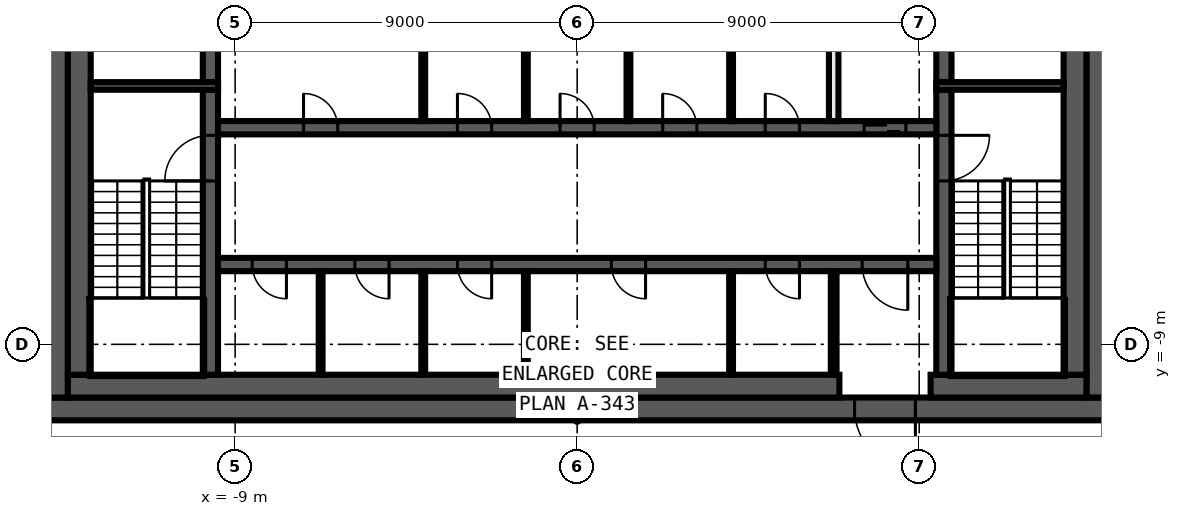
"""IFC4 building model, lengths in metres.
Left out: names, types, materials, properties, quantities, classifications, styles, units other than length and angle.
Written with IfcOpenShell. Run it as: python <this file> out.ifc"""

import sys

from ifc_helpers import new_model, si_unit, direction, frame, frame_2d, origin, place, context, subcontext, project, spatial, rectangle, extrude, element, fill, save


model = new_model("IFC4")
c1 = context("Model", 3, precision=1e-05, world=origin(), true_north=direction((0.0, 1.0)))
c2 = subcontext(c1, "Body", "Model", "MODEL_VIEW")
j1 = project(units=[si_unit("LENGTHUNIT", "METRE"), si_unit("PLANEANGLEUNIT", "RADIAN")], contexts=[c1])
p1 = place(None, origin())
s1 = spatial("IfcSite", under=j1, at=p1, CompositionType="ELEMENT")
p2 = place(p1, origin())
s2 = spatial("IfcBuilding", under=s1, at=p2, CompositionType="ELEMENT")
p3 = place(p2, frame((0.0, 0.0, 371.6)))
s3 = spatial("IfcBuildingStorey", under=s2, at=p3, CompositionType="ELEMENT", Elevation=371.6)
p4 = place(p3, frame((11.367, -20.469, 0.0), z_axis=(0.0, 0.0, 1.0), x_axis=(0.424125024155, 0.905603646131, 0.0)))
e1 = element("IfcWall", 1, at=p4, inside=s3, PredefinedType="SOLIDWALL", context=c2, shape_type="SweptSolid", body=[
    extrude(rectangle(XDim=28.801, YDim=0.25, at=frame_2d((14.401, 0.0))), origin(), (0.0, 0.0, 1.0), 3.8),
])
p5 = place(p3, frame((-11.138, 20.28, 0.0), z_axis=(0.0, 0.0, 1.0), x_axis=(-0.441342255748, -0.897338850876, 0.0)))
e2 = element("IfcWall", 2, at=p5, inside=s3, PredefinedType="SOLIDWALL", context=c2, shape_type="SweptSolid", body=[
    extrude(rectangle(XDim=28.805, YDim=0.25, at=frame_2d((14.403, 0.0))), origin(), (0.0, 0.0, 1.0), 3.8),
])
p6 = place(p3, frame((-23.851, -5.568, 0.0), z_axis=(0.0, 0.0, 1.0), x_axis=(0.701718568407, -0.712454244673, 0.0)))
e3 = element("IfcWall", 3, at=p6, inside=s3, PredefinedType="SOLIDWALL", context=c2, shape_type="SweptSolid", body=[
    extrude(rectangle(XDim=20.785, YDim=0.25, at=frame_2d((10.393, 0.0))), origin(), (0.0, 0.0, 1.0), 3.8),
])
p7 = place(p3, frame((14.0, -10.7, 0.0), z_axis=(0.0, 0.0, 1.0), x_axis=(-1.0, 0.0, 0.0)))
e4 = element("IfcWall", 4, at=p7, inside=s3, PredefinedType="SHEAR", context=c2, shape_type="SweptSolid", body=[
    extrude(rectangle(XDim=28.0, YDim=0.6, at=frame_2d((14.0, 0.0))), origin(), (0.0, 0.0, 1.0), 3.9),
])
p8 = place(p7, frame((5.1, 0.0, 0.0)))
e5 = element("IfcOpeningElement", 5, at=p8, cuts=e4, PredefinedType="OPENING", context=c2, shape_type="SweptSolid", body=[
    extrude(rectangle(XDim=1.6, YDim=2.1, at=frame_2d((0.8, 1.05))), frame((0.0, 0.31, 0.0), z_axis=(0.0, -1.0, 0.0), x_axis=(1.0, 0.0, 0.0)), (0.0, 0.0, 1.0), 0.62),
])
for number, where, z_axis, x_axis in (
    (6, (13.7, 10.4, 0.0), (0.0, 0.0, 1.0), (0.0, -1.0, 0.0)),
    (7, (-13.7, -10.4, 0.0), (0.0, 0.0, 1.0), (0.0, 1.0, 0.0)),
):
    element("IfcWall", number, at=place(p3, frame(where, z_axis=z_axis, x_axis=x_axis)), inside=s3, PredefinedType="SHEAR", context=c2, shape_type="SweptSolid", body=[
        extrude(rectangle(XDim=20.8, YDim=0.6, at=frame_2d((10.4, 0.0))), origin(), (0.0, 0.0, 1.0), 3.9),
    ])
p9 = place(p3, frame((13.4, -10.1, 0.0), z_axis=(0.0, 0.0, 1.0), x_axis=(-1.0, 0.0, 0.0)))
e8 = element("IfcWall", 8, at=p9, inside=s3, PredefinedType="SHEAR", context=c2, shape_type="SweptSolid", body=[
    extrude(rectangle(XDim=4.1, YDim=0.6, at=frame_2d((2.05, 0.0))), origin(), (0.0, 0.0, 1.0), 3.9),
])
p10 = place(p3, frame((6.9, -10.1, 0.0), z_axis=(0.0, 0.0, 1.0), x_axis=(-1.0, 0.0, 0.0)))
e9 = element("IfcWall", 9, at=p10, inside=s3, PredefinedType="SHEAR", context=c2, shape_type="SweptSolid", body=[
    extrude(rectangle(XDim=20.3, YDim=0.6, at=frame_2d((10.15, 0.0))), origin(), (0.0, 0.0, 1.0), 3.9),
])
for number, where, z_axis, x_axis in (
    (10, (13.1, 9.8, 0.0), (0.0, 0.0, 1.0), (0.0, -1.0, 0.0)),
    (11, (-13.1, -9.8, 0.0), (0.0, 0.0, 1.0), (0.0, 1.0, 0.0)),
):
    element("IfcWall", number, at=place(p3, frame(where, z_axis=z_axis, x_axis=x_axis)), inside=s3, PredefinedType="SHEAR", context=c2, shape_type="SweptSolid", body=[
        extrude(rectangle(XDim=19.6, YDim=0.6, at=frame_2d((9.8, 0.0))), origin(), (0.0, 0.0, 1.0), 3.9),
    ])
p11 = place(p3, frame((9.65, -2.3, 0.0), z_axis=(0.0, 0.0, 1.0), x_axis=(0.0, -1.0, 0.0)))
e12 = element("IfcWall", 12, at=p11, inside=s3, PredefinedType="SHEAR", context=c2, shape_type="SweptSolid", body=[
    extrude(rectangle(XDim=7.5, YDim=0.4, at=frame_2d((3.75, 0.0))), origin(), (0.0, 0.0, 1.0), 3.9),
])
p12 = place(p11, frame((1.2, 0.0, 0.0)))
e13 = element("IfcOpeningElement", 13, at=p12, cuts=e12, PredefinedType="OPENING", context=c2, shape_type="SweptSolid", body=[
    extrude(rectangle(XDim=1.2, YDim=2.1, at=frame_2d((0.6, 1.05))), frame((0.0, 0.21, 0.0), z_axis=(0.0, -1.0, 0.0), x_axis=(1.0, 0.0, 0.0)), (0.0, 0.0, 1.0), 0.42),
])
p13 = place(p3, frame((9.65, 2.1, 0.0), z_axis=(0.0, 0.0, 1.0), x_axis=(0.0, -1.0, 0.0)))
e14 = element("IfcWall", 14, at=p13, inside=s3, PredefinedType="SHEAR", context=c2, shape_type="SweptSolid", body=[
    extrude(rectangle(XDim=4.2, YDim=0.4, at=frame_2d((2.1, 0.0))), origin(), (0.0, 0.0, 1.0), 3.9),
])
p14 = place(p13, frame((0.15, 0.0, 0.0)))
e15 = element("IfcOpeningElement", 15, at=p14, cuts=e14, PredefinedType="OPENING", context=c2, shape_type="SweptSolid", body=[
    extrude(rectangle(XDim=0.9, YDim=2.1, at=frame_2d((0.45, 1.05))), frame((0.0, 0.21, 0.0), z_axis=(0.0, -1.0, 0.0), x_axis=(1.0, 0.0, 0.0)), (0.0, 0.0, 1.0), 0.42),
])
p15 = place(p3, frame((-9.65, -9.8, 0.0), z_axis=(0.0, 0.0, 1.0), x_axis=(0.0, 1.0, 0.0)))
e16 = element("IfcWall", 16, at=p15, inside=s3, PredefinedType="SHEAR", context=c2, shape_type="SweptSolid", body=[
    extrude(rectangle(XDim=7.5, YDim=0.4, at=frame_2d((3.75, 0.0))), origin(), (0.0, 0.0, 1.0), 3.9),
])
p16 = place(p15, frame((5.1, 0.0, 0.0)))
e17 = element("IfcOpeningElement", 17, at=p16, cuts=e16, PredefinedType="OPENING", context=c2, shape_type="SweptSolid", body=[
    extrude(rectangle(XDim=1.2, YDim=2.1, at=frame_2d((0.6, 1.05))), frame((0.0, 0.21, 0.0), z_axis=(0.0, -1.0, 0.0), x_axis=(1.0, 0.0, 0.0)), (0.0, 0.0, 1.0), 0.42),
])
p17 = place(p3, frame((-9.65, -2.1, 0.0), z_axis=(0.0, 0.0, 1.0), x_axis=(0.0, 1.0, 0.0)))
e18 = element("IfcWall", 18, at=p17, inside=s3, PredefinedType="SHEAR", context=c2, shape_type="SweptSolid", body=[
    extrude(rectangle(XDim=4.2, YDim=0.4, at=frame_2d((2.1, 0.0))), origin(), (0.0, 0.0, 1.0), 3.9),
])
for number, where, z_axis, x_axis in (
    (19, (9.45, -2.2, 0.0), (0.0, 0.0, 1.0), (1.0, 0.0, 0.0)),
    (20, (-9.45, -2.2, 0.0), (0.0, 0.0, 1.0), (-1.0, 0.0, 0.0)),
):
    element("IfcWall", number, at=place(p3, frame(where, z_axis=z_axis, x_axis=x_axis)), inside=s3, PredefinedType="SHEAR", context=c2, shape_type="SweptSolid", body=[
        extrude(rectangle(XDim=3.35, YDim=0.2, at=frame_2d((1.675, 0.0))), origin(), (0.0, 0.0, 1.0), 3.9),
    ])
p18 = place(p3, frame((-9.45, -3.3, 0.0), z_axis=(0.0, 0.0, 1.0), x_axis=(1.0, 0.0, 0.0)))
e21 = element("IfcWall", 21, at=p18, inside=s3, PredefinedType="SHEAR", context=c2, shape_type="SweptSolid", body=[
    extrude(rectangle(XDim=18.9, YDim=0.35, at=frame_2d((9.45, 0.0))), origin(), (0.0, 0.0, 1.0), 3.9),
])
p19 = place(p18, frame((17.0, 0.0, 0.0)))
e22 = element("IfcOpeningElement", 22, at=p19, cuts=e21, PredefinedType="OPENING", context=c2, shape_type="SweptSolid", body=[
    extrude(rectangle(XDim=1.1, YDim=2.1, at=frame_2d((0.55, 1.05))), frame((0.0, 0.185, 0.0), z_axis=(0.0, -1.0, 0.0), x_axis=(1.0, 0.0, 0.0)), (0.0, 0.0, 1.0), 0.37),
])
p20 = place(p18, frame((2.25, 0.0, 0.0)))
e23 = element("IfcOpeningElement", 23, at=p20, cuts=e21, PredefinedType="OPENING", context=c2, shape_type="SweptSolid", body=[
    extrude(rectangle(XDim=0.9, YDim=2.1, at=frame_2d((0.45, 1.05))), frame((0.0, 0.185, 0.0), z_axis=(0.0, -1.0, 0.0), x_axis=(1.0, 0.0, 0.0)), (0.0, 0.0, 1.0), 0.37),
])
p21 = place(p18, frame((6.3, 0.0, 0.0)))
e24 = element("IfcOpeningElement", 24, at=p21, cuts=e21, PredefinedType="OPENING", context=c2, shape_type="SweptSolid", body=[
    extrude(rectangle(XDim=0.9, YDim=2.1, at=frame_2d((0.45, 1.05))), frame((0.0, 0.185, 0.0), z_axis=(0.0, -1.0, 0.0), x_axis=(1.0, 0.0, 0.0)), (0.0, 0.0, 1.0), 0.37),
])
p22 = place(p18, frame((9.0, 0.0, 0.0)))
e25 = element("IfcOpeningElement", 25, at=p22, cuts=e21, PredefinedType="OPENING", context=c2, shape_type="SweptSolid", body=[
    extrude(rectangle(XDim=0.9, YDim=2.1, at=frame_2d((0.45, 1.05))), frame((0.0, 0.185, 0.0), z_axis=(0.0, -1.0, 0.0), x_axis=(1.0, 0.0, 0.0)), (0.0, 0.0, 1.0), 0.37),
])
p23 = place(p18, frame((11.7, 0.0, 0.0)))
e26 = element("IfcOpeningElement", 26, at=p23, cuts=e21, PredefinedType="OPENING", context=c2, shape_type="SweptSolid", body=[
    extrude(rectangle(XDim=0.9, YDim=2.1, at=frame_2d((0.45, 1.05))), frame((0.0, 0.185, 0.0), z_axis=(0.0, -1.0, 0.0), x_axis=(1.0, 0.0, 0.0)), (0.0, 0.0, 1.0), 0.37),
])
p24 = place(p18, frame((14.4, 0.0, 0.0)))
e27 = element("IfcOpeningElement", 27, at=p24, cuts=e21, PredefinedType="OPENING", context=c2, shape_type="SweptSolid", body=[
    extrude(rectangle(XDim=0.9, YDim=2.1, at=frame_2d((0.45, 1.05))), frame((0.0, 0.185, 0.0), z_axis=(0.0, -1.0, 0.0), x_axis=(1.0, 0.0, 0.0)), (0.0, 0.0, 1.0), 0.37),
])
p25 = place(p3, frame((9.45, -6.9, 0.0), z_axis=(0.0, 0.0, 1.0), x_axis=(-1.0, 0.0, 0.0)))
e28 = element("IfcWall", 28, at=p25, inside=s3, PredefinedType="SHEAR", context=c2, shape_type="SweptSolid", body=[
    extrude(rectangle(XDim=18.9, YDim=0.35, at=frame_2d((9.45, 0.0))), origin(), (0.0, 0.0, 1.0), 3.9),
])
p26 = place(p25, frame((0.75, 0.0, 0.0)))
e29 = element("IfcOpeningElement", 29, at=p26, cuts=e28, PredefinedType="OPENING", context=c2, shape_type="SweptSolid", body=[
    extrude(rectangle(XDim=1.2, YDim=2.1, at=frame_2d((0.6, 1.05))), frame((0.0, 0.185, 0.0), z_axis=(0.0, -1.0, 0.0), x_axis=(1.0, 0.0, 0.0)), (0.0, 0.0, 1.0), 0.37),
])
p27 = place(p25, frame((17.1, 0.0, 0.0)))
e30 = element("IfcOpeningElement", 30, at=p27, cuts=e28, PredefinedType="OPENING", context=c2, shape_type="SweptSolid", body=[
    extrude(rectangle(XDim=0.9, YDim=2.1, at=frame_2d((0.45, 1.05))), frame((0.0, 0.185, 0.0), z_axis=(0.0, -1.0, 0.0), x_axis=(1.0, 0.0, 0.0)), (0.0, 0.0, 1.0), 0.37),
])
p28 = place(p25, frame((14.4, 0.0, 0.0)))
e31 = element("IfcOpeningElement", 31, at=p28, cuts=e28, PredefinedType="OPENING", context=c2, shape_type="SweptSolid", body=[
    extrude(rectangle(XDim=0.9, YDim=2.1, at=frame_2d((0.45, 1.05))), frame((0.0, 0.185, 0.0), z_axis=(0.0, -1.0, 0.0), x_axis=(1.0, 0.0, 0.0)), (0.0, 0.0, 1.0), 0.37),
])
p29 = place(p25, frame((11.7, 0.0, 0.0)))
e32 = element("IfcOpeningElement", 32, at=p29, cuts=e28, PredefinedType="OPENING", context=c2, shape_type="SweptSolid", body=[
    extrude(rectangle(XDim=0.9, YDim=2.1, at=frame_2d((0.45, 1.05))), frame((0.0, 0.185, 0.0), z_axis=(0.0, -1.0, 0.0), x_axis=(1.0, 0.0, 0.0)), (0.0, 0.0, 1.0), 0.37),
])
p30 = place(p25, frame((7.65, 0.0, 0.0)))
e33 = element("IfcOpeningElement", 33, at=p30, cuts=e28, PredefinedType="OPENING", context=c2, shape_type="SweptSolid", body=[
    extrude(rectangle(XDim=0.9, YDim=2.1, at=frame_2d((0.45, 1.05))), frame((0.0, 0.185, 0.0), z_axis=(0.0, -1.0, 0.0), x_axis=(1.0, 0.0, 0.0)), (0.0, 0.0, 1.0), 0.37),
])
p31 = place(p25, frame((3.6, 0.0, 0.0)))
e34 = element("IfcOpeningElement", 34, at=p31, cuts=e28, PredefinedType="OPENING", context=c2, shape_type="SweptSolid", body=[
    extrude(rectangle(XDim=0.9, YDim=2.1, at=frame_2d((0.45, 1.05))), frame((0.0, 0.185, 0.0), z_axis=(0.0, -1.0, 0.0), x_axis=(1.0, 0.0, 0.0)), (0.0, 0.0, 1.0), 0.37),
])
p32 = place(p3, frame((6.75, -9.8, 0.0), z_axis=(0.0, 0.0, 1.0), x_axis=(0.0, 1.0, 0.0)))
e35 = element("IfcWall", 35, at=p32, inside=s3, PredefinedType="PARTITIONING", context=c2, shape_type="SweptSolid", body=[
    extrude(rectangle(XDim=2.725, YDim=0.15, at=frame_2d((1.363, 0.0))), origin(), (0.0, 0.0, 1.0), 3.9),
])
p33 = place(p3, frame((6.75, -3.125, 0.0), z_axis=(0.0, 0.0, 1.0), x_axis=(0.0, 1.0, 0.0)))
e36 = element("IfcWall", 36, at=p33, inside=s3, PredefinedType="SOLIDWALL", context=c2, shape_type="SweptSolid", body=[
    extrude(rectangle(XDim=2.725, YDim=0.25, at=frame_2d((1.363, 0.0))), origin(), (0.0, 0.0, 1.0), 3.9),
])
for number, where, z_axis, x_axis in (
    (37, (4.05, -9.8, 0.0), (0.0, 0.0, 1.0), (0.0, 1.0, 0.0)),
    (38, (4.05, -3.125, 0.0), (0.0, 0.0, 1.0), (0.0, 1.0, 0.0)),
    (39, (1.35, -3.125, 0.0), (0.0, 0.0, 1.0), (0.0, 1.0, 0.0)),
    (40, (-1.35, -9.8, 0.0), (0.0, 0.0, 1.0), (0.0, 1.0, 0.0)),
    (41, (-1.35, -3.125, 0.0), (0.0, 0.0, 1.0), (0.0, 1.0, 0.0)),
    (42, (-4.05, -9.8, 0.0), (0.0, 0.0, 1.0), (0.0, 1.0, 0.0)),
    (43, (-4.05, -3.125, 0.0), (0.0, 0.0, 1.0), (0.0, 1.0, 0.0)),
    (44, (-6.75, -9.8, 0.0), (0.0, 0.0, 1.0), (0.0, 1.0, 0.0)),
):
    element("IfcWall", number, at=place(p3, frame(where, z_axis=z_axis, x_axis=x_axis)), inside=s3, PredefinedType="PARTITIONING", context=c2, shape_type="SweptSolid", body=[
        extrude(rectangle(XDim=2.725, YDim=0.1, at=frame_2d((1.363, 0.0))), origin(), (0.0, 0.0, 1.0), 3.9),
    ])
p34 = place(p19, origin())
e45 = element("IfcDoor", 45, at=p34, inside=s3, OperationType="DOUBLE_DOOR_SLIDING", PredefinedType="DOOR", context=c2, shape_type="SweptSolid", body=[
    extrude(rectangle(XDim=1.1, YDim=2.1, at=frame_2d((0.55, 1.05))), frame((0.0, 0.025, 0.0), z_axis=(0.0, -1.0, 0.0), x_axis=(1.0, 0.0, 0.0)), (0.0, 0.0, 1.0), 0.05),
])
fill(e22, e45)
p35 = place(p8, origin())
e46 = element("IfcDoor", 46, at=p35, inside=s3, OperationType="DOUBLE_DOOR_SINGLE_SWING", PredefinedType="DOOR", context=c2, shape_type="SweptSolid", body=[
    extrude(rectangle(XDim=1.6, YDim=2.1, at=frame_2d((0.8, 1.05))), frame((0.0, 0.025, 0.0), z_axis=(0.0, -1.0, 0.0), x_axis=(1.0, 0.0, 0.0)), (0.0, 0.0, 1.0), 0.05),
])
fill(e5, e46)
p36 = place(p26, origin())
e47 = element("IfcDoor", 47, at=p36, inside=s3, OperationType="SINGLE_SWING_LEFT", PredefinedType="DOOR", context=c2, shape_type="SweptSolid", body=[
    extrude(rectangle(XDim=1.2, YDim=2.1, at=frame_2d((0.6, 1.05))), frame((0.0, 0.025, 0.0), z_axis=(0.0, -1.0, 0.0), x_axis=(1.0, 0.0, 0.0)), (0.0, 0.0, 1.0), 0.05),
])
fill(e29, e47)
p37 = place(p20, origin())
e48 = element("IfcDoor", 48, at=p37, inside=s3, OperationType="SINGLE_SWING_LEFT", PredefinedType="DOOR", context=c2, shape_type="SweptSolid", body=[
    extrude(rectangle(XDim=0.9, YDim=2.1, at=frame_2d((0.45, 1.05))), frame((0.0, 0.025, 0.0), z_axis=(0.0, -1.0, 0.0), x_axis=(1.0, 0.0, 0.0)), (0.0, 0.0, 1.0), 0.05),
])
fill(e23, e48)
p38 = place(p21, origin())
e49 = element("IfcDoor", 49, at=p38, inside=s3, OperationType="SINGLE_SWING_RIGHT", PredefinedType="DOOR", context=c2, shape_type="SweptSolid", body=[
    extrude(rectangle(XDim=0.9, YDim=2.1, at=frame_2d((0.45, 1.05))), frame((0.0, 0.025, 0.0), z_axis=(0.0, -1.0, 0.0), x_axis=(1.0, 0.0, 0.0)), (0.0, 0.0, 1.0), 0.05),
])
fill(e24, e49)
p39 = place(p22, origin())
e50 = element("IfcDoor", 50, at=p39, inside=s3, OperationType="SINGLE_SWING_LEFT", PredefinedType="DOOR", context=c2, shape_type="SweptSolid", body=[
    extrude(rectangle(XDim=0.9, YDim=2.1, at=frame_2d((0.45, 1.05))), frame((0.0, 0.025, 0.0), z_axis=(0.0, -1.0, 0.0), x_axis=(1.0, 0.0, 0.0)), (0.0, 0.0, 1.0), 0.05),
])
fill(e25, e50)
p40 = place(p23, origin())
e51 = element("IfcDoor", 51, at=p40, inside=s3, OperationType="SINGLE_SWING_RIGHT", PredefinedType="DOOR", context=c2, shape_type="SweptSolid", body=[
    extrude(rectangle(XDim=0.9, YDim=2.1, at=frame_2d((0.45, 1.05))), frame((0.0, 0.025, 0.0), z_axis=(0.0, -1.0, 0.0), x_axis=(1.0, 0.0, 0.0)), (0.0, 0.0, 1.0), 0.05),
])
fill(e26, e51)
p41 = place(p24, origin())
e52 = element("IfcDoor", 52, at=p41, inside=s3, OperationType="SINGLE_SWING_LEFT", PredefinedType="DOOR", context=c2, shape_type="SweptSolid", body=[
    extrude(rectangle(XDim=0.9, YDim=2.1, at=frame_2d((0.45, 1.05))), frame((0.0, 0.025, 0.0), z_axis=(0.0, -1.0, 0.0), x_axis=(1.0, 0.0, 0.0)), (0.0, 0.0, 1.0), 0.05),
])
fill(e27, e52)
p42 = place(p27, origin())
e53 = element("IfcDoor", 53, at=p42, inside=s3, OperationType="SINGLE_SWING_RIGHT", PredefinedType="DOOR", context=c2, shape_type="SweptSolid", body=[
    extrude(rectangle(XDim=0.9, YDim=2.1, at=frame_2d((0.45, 1.05))), frame((0.0, 0.025, 0.0), z_axis=(0.0, -1.0, 0.0), x_axis=(1.0, 0.0, 0.0)), (0.0, 0.0, 1.0), 0.05),
])
fill(e30, e53)
p43 = place(p28, origin())
e54 = element("IfcDoor", 54, at=p43, inside=s3, OperationType="SINGLE_SWING_LEFT", PredefinedType="DOOR", context=c2, shape_type="SweptSolid", body=[
    extrude(rectangle(XDim=0.9, YDim=2.1, at=frame_2d((0.45, 1.05))), frame((0.0, 0.025, 0.0), z_axis=(0.0, -1.0, 0.0), x_axis=(1.0, 0.0, 0.0)), (0.0, 0.0, 1.0), 0.05),
])
fill(e31, e54)
p44 = place(p29, origin())
e55 = element("IfcDoor", 55, at=p44, inside=s3, OperationType="SINGLE_SWING_RIGHT", PredefinedType="DOOR", context=c2, shape_type="SweptSolid", body=[
    extrude(rectangle(XDim=0.9, YDim=2.1, at=frame_2d((0.45, 1.05))), frame((0.0, 0.025, 0.0), z_axis=(0.0, -1.0, 0.0), x_axis=(1.0, 0.0, 0.0)), (0.0, 0.0, 1.0), 0.05),
])
fill(e32, e55)
p45 = place(p30, origin())
e56 = element("IfcDoor", 56, at=p45, inside=s3, OperationType="SINGLE_SWING_LEFT", PredefinedType="DOOR", context=c2, shape_type="SweptSolid", body=[
    extrude(rectangle(XDim=0.9, YDim=2.1, at=frame_2d((0.45, 1.05))), frame((0.0, 0.025, 0.0), z_axis=(0.0, -1.0, 0.0), x_axis=(1.0, 0.0, 0.0)), (0.0, 0.0, 1.0), 0.05),
])
fill(e33, e56)
p46 = place(p31, origin())
e57 = element("IfcDoor", 57, at=p46, inside=s3, OperationType="SINGLE_SWING_RIGHT", PredefinedType="DOOR", context=c2, shape_type="SweptSolid", body=[
    extrude(rectangle(XDim=0.9, YDim=2.1, at=frame_2d((0.45, 1.05))), frame((0.0, 0.025, 0.0), z_axis=(0.0, -1.0, 0.0), x_axis=(1.0, 0.0, 0.0)), (0.0, 0.0, 1.0), 0.05),
])
fill(e34, e57)
p47 = place(p12, origin())
e58 = element("IfcDoor", 58, at=p47, inside=s3, OperationType="SINGLE_SWING_RIGHT", PredefinedType="DOOR", context=c2, shape_type="SweptSolid", body=[
    extrude(rectangle(XDim=1.2, YDim=2.1, at=frame_2d((0.6, 1.05))), frame((0.0, 0.025, 0.0), z_axis=(0.0, -1.0, 0.0), x_axis=(1.0, 0.0, 0.0)), (0.0, 0.0, 1.0), 0.05),
])
fill(e13, e58)
p48 = place(p16, origin())
e59 = element("IfcDoor", 59, at=p48, inside=s3, OperationType="SINGLE_SWING_LEFT", PredefinedType="DOOR", context=c2, shape_type="SweptSolid", body=[
    extrude(rectangle(XDim=1.2, YDim=2.1, at=frame_2d((0.6, 1.05))), frame((0.0, 0.025, 0.0), z_axis=(0.0, -1.0, 0.0), x_axis=(1.0, 0.0, 0.0)), (0.0, 0.0, 1.0), 0.05),
])
fill(e17, e59)
save(model, sys.argv[1])
